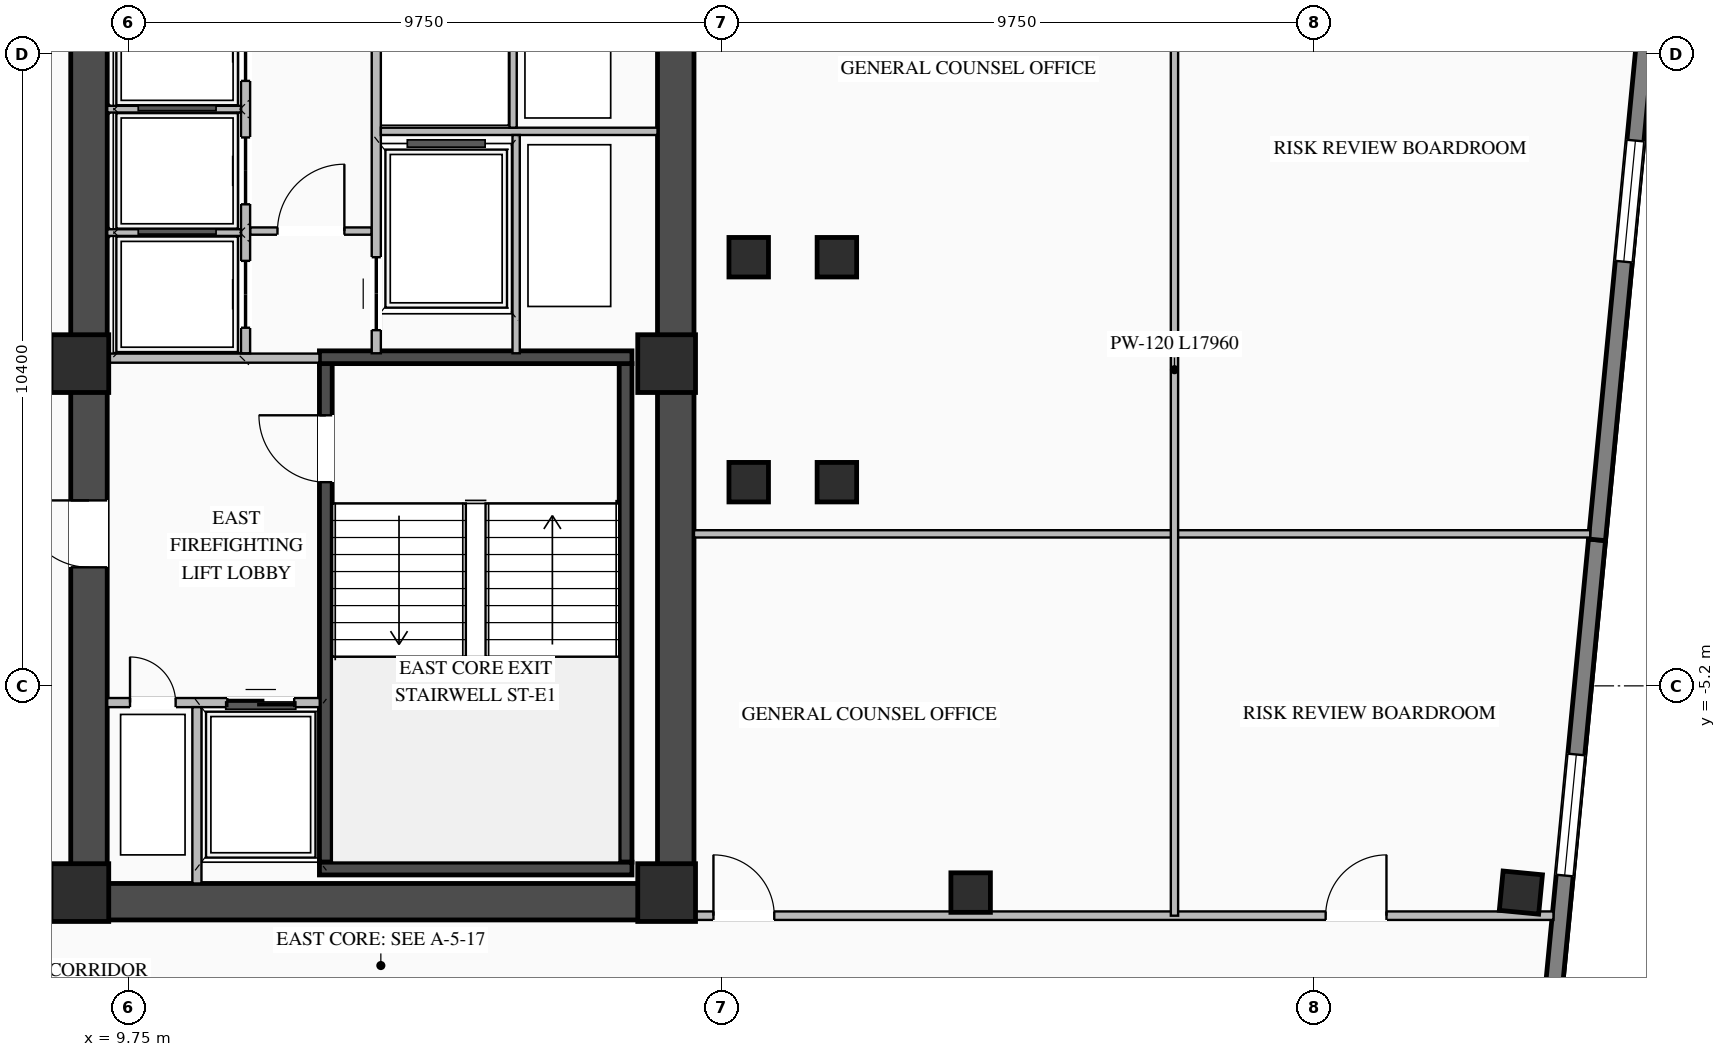
"""IFC4 building model, lengths in metres.
Left out: names, types, materials, properties, quantities, classifications, styles, units other than length and angle.
Written with IfcOpenShell. Run it as: python <this file> out.ifc"""

import sys

from ifc_helpers import new_model, si_unit, direction, frame, frame_2d, origin, origin_2d, place, context, subcontext, project, spatial, rectangle, i_section, extrude, element, fill, save


model = new_model("IFC4")
c1 = context("Model", 3, precision=1e-05, world=origin(), true_north=direction((0.0, 1.0)))
c2 = subcontext(c1, "Body", "Model", "MODEL_VIEW")
j1 = project(units=[si_unit("LENGTHUNIT", "METRE"), si_unit("PLANEANGLEUNIT", "RADIAN")], contexts=[c1])
p1 = place(None, origin())
s1 = spatial("IfcSite", under=j1, at=p1, CompositionType="ELEMENT")
p2 = place(p1, origin())
s2 = spatial("IfcBuilding", under=s1, at=p2, CompositionType="ELEMENT")
p3 = place(p2, frame((0.0, 0.0, 160.4)))
s3 = spatial("IfcBuildingStorey", under=s2, at=p3, CompositionType="ELEMENT", Elevation=160.4)
p4 = place(p3, frame((8.8, -8.75, 0.0), z_axis=(0.0, 0.0, 1.0), x_axis=(1.0, 0.0, 0.0)))
e1 = element("IfcWall", 1, at=p4, inside=s3, PredefinedType="SHEAR", context=c2, shape_type="SweptSolid", body=[
    extrude(rectangle(XDim=10.25, YDim=0.6, at=frame_2d((5.125, 0.0))), origin(), (0.0, 0.0, 1.0), 3.27),
])
p5 = place(p3, frame((9.1, -8.45, 0.0), z_axis=(0.0, 0.0, 1.0), x_axis=(0.0, 1.0, 0.0)))
e2 = element("IfcWall", 2, at=p5, inside=s3, PredefinedType="SHEAR", context=c2, shape_type="SweptSolid", body=[
    extrude(rectangle(XDim=16.9, YDim=0.6, at=frame_2d((8.45, 0.0))), origin(), (0.0, 0.0, 1.0), 3.27),
])
p6 = place(p5, frame((5.2, 0.0, 0.0)))
e3 = element("IfcOpeningElement", 3, at=p6, cuts=e2, PredefinedType="OPENING", context=c2, shape_type="SweptSolid", body=[
    extrude(rectangle(XDim=1.1, YDim=2.08, at=frame_2d((0.55, 1.04))), frame((0.0, 0.31, 0.0), z_axis=(0.0, -1.0, 0.0), x_axis=(1.0, 0.0, 0.0)), (0.0, 0.0, 1.0), 0.62),
])
p7 = place(p3, frame((18.75, -8.45, 0.0), z_axis=(0.0, 0.0, 1.0), x_axis=(0.0, 1.0, 0.0)))
e4 = element("IfcWall", 4, at=p7, inside=s3, PredefinedType="SHEAR", context=c2, shape_type="SweptSolid", body=[
    extrude(rectangle(XDim=16.9, YDim=0.6, at=frame_2d((8.45, 0.0))), origin(), (0.0, 0.0, 1.0), 3.27),
])
p8 = place(p3, frame((12.995, -8.1, 0.0), z_axis=(0.0, 0.0, 1.0), x_axis=(0.0, 1.0, 0.0)))
e5 = element("IfcWall", 5, at=p8, inside=s3, PredefinedType="SHEAR", context=c2, shape_type="SweptSolid", body=[
    extrude(rectangle(XDim=8.2, YDim=0.21, at=frame_2d((4.1, 0.0))), origin(), (0.0, 0.0, 1.0), 3.27),
])
p9 = place(p8, frame((6.25, 0.0, 0.0)))
e6 = element("IfcOpeningElement", 6, at=p9, cuts=e5, PredefinedType="OPENING", context=c2, shape_type="SweptSolid", body=[
    extrude(rectangle(XDim=1.1, YDim=2.15, at=frame_2d((0.55, 1.075))), frame((0.0, 0.115, 0.0), z_axis=(0.0, -1.0, 0.0), x_axis=(1.0, 0.0, 0.0)), (0.0, 0.0, 1.0), 0.23),
])
p10 = place(p3, frame((17.925, -8.1, 0.0), z_axis=(0.0, 0.0, 1.0), x_axis=(0.0, 1.0, 0.0)))
e7 = element("IfcWall", 7, at=p10, inside=s3, PredefinedType="SHEAR", context=c2, shape_type="SweptSolid", body=[
    extrude(rectangle(XDim=8.2, YDim=0.21, at=frame_2d((4.1, 0.0))), origin(), (0.0, 0.0, 1.0), 3.27),
])
for number, where, z_axis, x_axis in (
    (8, (12.89, -8.205, 0.0), (0.0, 0.0, 1.0), (1.0, 0.0, 0.0)),
    (9, (18.03, 0.205, 0.0), (0.0, 0.0, 1.0), (-1.0, 0.0, 0.0)),
):
    element("IfcWall", number, at=place(p3, frame(where, z_axis=z_axis, x_axis=x_axis)), inside=s3, PredefinedType="SHEAR", context=c2, shape_type="SweptSolid", body=[
        extrude(rectangle(XDim=5.14, YDim=0.21, at=frame_2d((2.57, 0.0))), origin(), (0.0, 0.0, 1.0), 3.27),
    ])
for number, where, z_axis, x_axis in (
    (10, (8.95, -8.6, 0.0), (0.0, 0.0, 1.0), (1.0, 0.0, 0.0)),
    (11, (8.95, 0.1, 0.0), (0.0, 0.0, 1.0), (1.0, 0.0, 0.0)),
    (12, (18.6, -8.6, 0.0), (0.0, 0.0, 1.0), (1.0, 0.0, 0.0)),
    (13, (18.6, 0.1, 0.0), (0.0, 0.0, 1.0), (1.0, 0.0, 0.0)),
):
    element("IfcColumn", number, at=place(p3, frame(where, z_axis=z_axis, x_axis=x_axis)), inside=s3, PredefinedType="COLUMN", context=c2, shape_type="SweptSolid", body=[
        extrude(rectangle(XDim=0.95, YDim=0.95, at=origin_2d()), origin(), (0.0, 0.0, 1.0), 3.45),
    ])
for number, where, z_axis, x_axis in (
    (14, (19.95, -1.85, 0.0), (0.0, 0.0, 1.0), (1.0, 0.0, 0.0)),
    (15, (19.95, 1.85, 0.0), (0.0, 0.0, 1.0), (1.0, 0.0, 0.0)),
    (16, (21.4, -1.85, 0.0), (0.0, 0.0, 1.0), (1.0, 0.0, 0.0)),
    (17, (21.4, 1.85, 0.0), (0.0, 0.0, 1.0), (1.0, 0.0, 0.0)),
    (18, (23.6, -8.6, 0.0), (0.0, 0.0, 1.0), (1.0, 0.0, 0.0)),
    (19, (32.649, -8.6, 0.0), (0.0, 0.0, 1.0), (0.995, -0.096, 0.0)),
):
    element("IfcColumn", number, at=place(p3, frame(where, z_axis=z_axis, x_axis=x_axis)), inside=s3, PredefinedType="COLUMN", context=c2, shape_type="SweptSolid", body=[
        extrude(i_section(OverallWidth=0.65, OverallDepth=0.65, WebThickness=0.028, FlangeThickness=0.04, at=origin_2d()), origin(), (0.0, 0.0, 1.0), 3.45),
    ])
p11 = place(p3, frame((33.901, -2.798, 0.0), z_axis=(0.0, 0.0, 1.0), x_axis=(-0.095853434568, -0.99539545864, 0.0)))
e20 = element("IfcWall", 20, at=p11, inside=s3, PredefinedType="STANDARD", context=c2, shape_type="SweptSolid", body=[
    extrude(rectangle(XDim=16.79, YDim=0.28, at=frame_2d((8.395, 0.0))), origin(), (0.0, 0.0, 1.0), 3.25),
])
p12 = place(p11, frame((3.547, 0.0, 0.76)))
e21 = element("IfcOpeningElement", 21, at=p12, cuts=e20, PredefinedType="OPENING", context=c2, shape_type="SweptSolid", body=[
    extrude(rectangle(XDim=2.0, YDim=2.05, at=frame_2d((1.0, 1.025))), frame((0.0, 0.15, 0.0), z_axis=(0.0, -1.0, 0.0), x_axis=(1.0, 0.0, 0.0)), (0.0, 0.0, 1.0), 0.3),
])
p13 = place(p11, frame((10.193, 0.0, 0.76)))
e22 = element("IfcOpeningElement", 22, at=p13, cuts=e20, PredefinedType="OPENING", context=c2, shape_type="SweptSolid", body=[
    extrude(rectangle(XDim=2.0, YDim=2.05, at=frame_2d((1.0, 1.025))), frame((0.0, 0.15, 0.0), z_axis=(0.0, -1.0, 0.0), x_axis=(1.0, 0.0, 0.0)), (0.0, 0.0, 1.0), 0.3),
])
p14 = place(p3, frame((35.51, 13.914, 0.0), z_axis=(0.0, 0.0, 1.0), x_axis=(-0.095839027265, -0.995396845913, 0.0)))
e23 = element("IfcWall", 23, at=p14, inside=s3, PredefinedType="STANDARD", context=c2, shape_type="SweptSolid", body=[
    extrude(rectangle(XDim=16.79, YDim=0.28, at=frame_2d((8.395, 0.0))), origin(), (0.0, 0.0, 1.0), 3.25),
])
p15 = place(p14, frame((5.647, 0.0, 0.76)))
e24 = element("IfcOpeningElement", 24, at=p15, cuts=e23, PredefinedType="OPENING", context=c2, shape_type="SweptSolid", body=[
    extrude(rectangle(XDim=2.0, YDim=2.05, at=frame_2d((1.0, 1.025))), frame((0.0, 0.15, 0.0), z_axis=(0.0, -1.0, 0.0), x_axis=(1.0, 0.0, 0.0)), (0.0, 0.0, 1.0), 0.3),
])
p16 = place(p14, frame((10.193, 0.0, 0.76)))
e25 = element("IfcOpeningElement", 25, at=p16, cuts=e23, PredefinedType="OPENING", context=c2, shape_type="SweptSolid", body=[
    extrude(rectangle(XDim=2.0, YDim=2.05, at=frame_2d((1.0, 1.025))), frame((0.0, 0.15, 0.0), z_axis=(0.0, -1.0, 0.0), x_axis=(1.0, 0.0, 0.0)), (0.0, 0.0, 1.0), 0.3),
])
p17 = place(p3, frame((9.4, -5.475, 0.0), z_axis=(0.0, 0.0, 1.0), x_axis=(1.0, 0.0, 0.0)))
e26 = element("IfcWall", 26, at=p17, inside=s3, PredefinedType="STANDARD", context=c2, shape_type="SweptSolid", body=[
    extrude(rectangle(XDim=3.495, YDim=0.15, at=frame_2d((1.748, 0.0))), origin(), (0.0, 0.0, 1.0), 3.25),
])
p18 = place(p17, frame((1.975, 0.0, 0.0)))
e27 = element("IfcOpeningElement", 27, at=p18, cuts=e26, PredefinedType="OPENING", context=c2, shape_type="SweptSolid", body=[
    extrude(rectangle(XDim=1.1, YDim=2.15, at=frame_2d((0.55, 1.075))), frame((0.0, 0.085, 0.0), z_axis=(0.0, -1.0, 0.0), x_axis=(1.0, 0.0, 0.0)), (0.0, 0.0, 1.0), 0.17),
])
p19 = place(p17, frame((0.375, 0.0, 0.0)))
e28 = element("IfcOpeningElement", 28, at=p19, cuts=e26, PredefinedType="OPENING", context=c2, shape_type="SweptSolid", body=[
    extrude(rectangle(XDim=0.75, YDim=2.05, at=frame_2d((0.375, 1.025))), frame((0.0, 0.085, 0.0), z_axis=(0.0, -1.0, 0.0), x_axis=(1.0, 0.0, 0.0)), (0.0, 0.0, 1.0), 0.17),
])
p20 = place(p3, frame((10.875, -8.45, 0.0), z_axis=(0.0, 0.0, 1.0), x_axis=(0.0, 1.0, 0.0)))
e29 = element("IfcWall", 29, at=p20, inside=s3, PredefinedType="STANDARD", context=c2, shape_type="SweptSolid", body=[
    extrude(rectangle(XDim=2.9, YDim=0.15, at=frame_2d((1.45, 0.0))), origin(), (0.0, 0.0, 1.0), 3.25),
])
p21 = place(p3, frame((9.4, 0.19, 0.0), z_axis=(0.0, 0.0, 1.0), x_axis=(1.0, 0.0, 0.0)))
e30 = element("IfcWall", 30, at=p21, inside=s3, PredefinedType="STANDARD", context=c2, shape_type="SweptSolid", body=[
    extrude(rectangle(XDim=3.49, YDim=0.15, at=frame_2d((1.745, 0.0))), origin(), (0.0, 0.0, 1.0), 2.645),
])
p22 = place(p3, frame((11.75, 2.28, 0.0), z_axis=(0.0, 0.0, 1.0), x_axis=(1.0, 0.0, 0.0)))
e31 = element("IfcWall", 31, at=p22, inside=s3, PredefinedType="STANDARD", context=c2, shape_type="SweptSolid", body=[
    extrude(rectangle(XDim=2.0, YDim=0.12, at=frame_2d((1.0, 0.0))), origin(), (0.0, 0.0, 1.0), 3.25),
])
p23 = place(p22, frame((0.45, 0.0, 0.0)))
e32 = element("IfcOpeningElement", 32, at=p23, cuts=e31, PredefinedType="OPENING", context=c2, shape_type="SweptSolid", body=[
    extrude(rectangle(XDim=1.1, YDim=2.1, at=frame_2d((0.55, 1.05))), frame((0.0, 0.07, 0.0), z_axis=(0.0, -1.0, 0.0), x_axis=(1.0, 0.0, 0.0)), (0.0, 0.0, 1.0), 0.14),
])
p24 = place(p3, frame((11.675, 0.27, 0.0), z_axis=(0.0, 0.0, 1.0), x_axis=(0.0, 1.0, 0.0)))
e33 = element("IfcWall", 33, at=p24, inside=s3, PredefinedType="STANDARD", context=c2, shape_type="SweptSolid", body=[
    extrude(rectangle(XDim=8.18, YDim=0.15, at=frame_2d((4.09, 0.0))), origin(), (0.0, 0.0, 1.0), 3.25),
])
p25 = place(p24, frame((0.42, 0.0, 0.0)))
e34 = element("IfcOpeningElement", 34, at=p25, cuts=e33, PredefinedType="OPENING", context=c2, shape_type="SweptSolid", body=[
    extrude(rectangle(XDim=1.1, YDim=2.1, at=frame_2d((0.55, 1.05))), frame((0.0, 0.085, 0.0), z_axis=(0.0, -1.0, 0.0), x_axis=(1.0, 0.0, 0.0)), (0.0, 0.0, 1.0), 0.17),
])
p26 = place(p24, frame((2.45, 0.0, 0.0)))
e35 = element("IfcOpeningElement", 35, at=p26, cuts=e33, PredefinedType="OPENING", context=c2, shape_type="SweptSolid", body=[
    extrude(rectangle(XDim=1.1, YDim=2.1, at=frame_2d((0.55, 1.05))), frame((0.0, 0.085, 0.0), z_axis=(0.0, -1.0, 0.0), x_axis=(1.0, 0.0, 0.0)), (0.0, 0.0, 1.0), 0.17),
])
p27 = place(p24, frame((4.48, 0.0, 0.0)))
e36 = element("IfcOpeningElement", 36, at=p27, cuts=e33, PredefinedType="OPENING", context=c2, shape_type="SweptSolid", body=[
    extrude(rectangle(XDim=1.1, YDim=2.1, at=frame_2d((0.55, 1.05))), frame((0.0, 0.085, 0.0), z_axis=(0.0, -1.0, 0.0), x_axis=(1.0, 0.0, 0.0)), (0.0, 0.0, 1.0), 0.17),
])
p28 = place(p24, frame((6.51, 0.0, 0.0)))
e37 = element("IfcOpeningElement", 37, at=p28, cuts=e33, PredefinedType="OPENING", context=c2, shape_type="SweptSolid", body=[
    extrude(rectangle(XDim=1.1, YDim=2.1, at=frame_2d((0.55, 1.05))), frame((0.0, 0.085, 0.0), z_axis=(0.0, -1.0, 0.0), x_axis=(1.0, 0.0, 0.0)), (0.0, 0.0, 1.0), 0.17),
])
for number, where, z_axis, x_axis in (
    (38, (9.4, 2.255, 0.0), (0.0, 0.0, 1.0), (1.0, 0.0, 0.0)),
    (39, (9.4, 4.285, 0.0), (0.0, 0.0, 1.0), (1.0, 0.0, 0.0)),
):
    element("IfcWall", number, at=place(p3, frame(where, z_axis=z_axis, x_axis=x_axis)), inside=s3, PredefinedType="STANDARD", context=c2, shape_type="SweptSolid", body=[
        extrude(rectangle(XDim=2.2, YDim=0.11, at=frame_2d((1.1, 0.0))), origin(), (0.0, 0.0, 1.0), 3.25),
    ])
p29 = place(p3, frame((13.825, 0.27, 0.0), z_axis=(0.0, 0.0, 1.0), x_axis=(0.0, 1.0, 0.0)))
e40 = element("IfcWall", 40, at=p29, inside=s3, PredefinedType="STANDARD", context=c2, shape_type="SweptSolid", body=[
    extrude(rectangle(XDim=8.18, YDim=0.15, at=frame_2d((4.09, 0.0))), origin(), (0.0, 0.0, 1.0), 3.25),
])
p30 = place(p29, frame((0.38, 0.0, 0.0)))
e41 = element("IfcOpeningElement", 41, at=p30, cuts=e40, PredefinedType="OPENING", context=c2, shape_type="SweptSolid", body=[
    extrude(rectangle(XDim=1.2, YDim=2.1, at=frame_2d((0.6, 1.05))), frame((0.0, 0.085, 0.0), z_axis=(0.0, -1.0, 0.0), x_axis=(1.0, 0.0, 0.0)), (0.0, 0.0, 1.0), 0.17),
])
p31 = place(p3, frame((13.9, 3.92, 0.0), z_axis=(0.0, 0.0, 1.0), x_axis=(1.0, 0.0, 0.0)))
e42 = element("IfcWall", 42, at=p31, inside=s3, PredefinedType="STANDARD", context=c2, shape_type="SweptSolid", body=[
    extrude(rectangle(XDim=4.55, YDim=0.12, at=frame_2d((2.275, 0.0))), origin(), (0.0, 0.0, 1.0), 3.25),
])
p32 = place(p3, frame((16.075, 3.98, 0.0), z_axis=(0.0, 0.0, 1.0), x_axis=(0.0, 1.0, 0.0)))
e43 = element("IfcWall", 43, at=p32, inside=s3, PredefinedType="STANDARD", context=c2, shape_type="SweptSolid", body=[
    extrude(rectangle(XDim=4.47, YDim=0.12, at=frame_2d((2.235, 0.0))), origin(), (0.0, 0.0, 1.0), 3.25),
])
p33 = place(p3, frame((16.125, 0.27, 0.0), z_axis=(0.0, 0.0, 1.0), x_axis=(0.0, 1.0, 0.0)))
e44 = element("IfcWall", 44, at=p33, inside=s3, PredefinedType="STANDARD", context=c2, shape_type="SweptSolid", body=[
    extrude(rectangle(XDim=3.59, YDim=0.12, at=frame_2d((1.795, 0.0))), origin(), (0.0, 0.0, 1.0), 3.25),
])
p34 = place(p3, frame((19.05, -8.98, 0.0), z_axis=(0.0, 0.0, 1.0), x_axis=(1.0, 0.0, 0.0)))
e45 = element("IfcWall", 45, at=p34, inside=s3, PredefinedType="STANDARD", context=c2, shape_type="SweptSolid", body=[
    extrude(rectangle(XDim=14.135, YDim=0.14, at=frame_2d((7.067, 0.0))), origin(), (0.0, 0.0, 1.0), 3.25),
])
p35 = place(p34, frame((0.32, 0.0, 0.0)))
e46 = element("IfcOpeningElement", 46, at=p35, cuts=e45, PredefinedType="OPENING", context=c2, shape_type="SweptSolid", body=[
    extrude(rectangle(XDim=1.0, YDim=2.08, at=frame_2d((0.5, 1.04))), frame((0.0, 0.08, 0.0), z_axis=(0.0, -1.0, 0.0), x_axis=(1.0, 0.0, 0.0)), (0.0, 0.0, 1.0), 0.16),
])
p36 = place(p34, frame((10.388, 0.0, 0.0)))
e47 = element("IfcOpeningElement", 47, at=p36, cuts=e45, PredefinedType="OPENING", context=c2, shape_type="SweptSolid", body=[
    extrude(rectangle(XDim=1.0, YDim=2.08, at=frame_2d((0.5, 1.04))), frame((0.0, 0.08, 0.0), z_axis=(0.0, -1.0, 0.0), x_axis=(1.0, 0.0, 0.0)), (0.0, 0.0, 1.0), 0.16),
])
p37 = place(p3, frame((19.05, -2.7, 0.0), z_axis=(0.0, 0.0, 1.0), x_axis=(1.0, 0.0, 0.0)))
e48 = element("IfcWall", 48, at=p37, inside=s3, PredefinedType="STANDARD", context=c2, shape_type="SweptSolid", body=[
    extrude(rectangle(XDim=14.74, YDim=0.12, at=frame_2d((7.37, 0.0))), origin(), (0.0, 0.0, 1.0), 3.25),
])
p38 = place(p3, frame((26.952, -8.98, 0.0), z_axis=(0.0, 0.0, 1.0), x_axis=(0.0, 1.0, 0.0)))
e49 = element("IfcWall", 49, at=p38, inside=s3, PredefinedType="STANDARD", context=c2, shape_type="SweptSolid", body=[
    extrude(rectangle(XDim=17.96, YDim=0.12, at=frame_2d((8.98, 0.0))), origin(), (0.0, 0.0, 1.0), 3.25),
])
p39 = place(p12, origin())
e50 = element("IfcWindow", 50, at=p39, inside=s3, PartitioningType="DOUBLE_PANEL_VERTICAL", PredefinedType="WINDOW", context=c2, shape_type="SweptSolid", body=[
    extrude(rectangle(XDim=2.0, YDim=2.05, at=frame_2d((1.0, 1.025))), frame((0.0, 0.03, 0.0), z_axis=(0.0, -1.0, 0.0), x_axis=(1.0, 0.0, 0.0)), (0.0, 0.0, 1.0), 0.06),
])
fill(e21, e50)
p40 = place(p16, origin())
e51 = element("IfcWindow", 51, at=p40, inside=s3, PartitioningType="DOUBLE_PANEL_VERTICAL", PredefinedType="WINDOW", context=c2, shape_type="SweptSolid", body=[
    extrude(rectangle(XDim=2.0, YDim=2.05, at=frame_2d((1.0, 1.025))), frame((0.0, 0.03, 0.0), z_axis=(0.0, -1.0, 0.0), x_axis=(1.0, 0.0, 0.0)), (0.0, 0.0, 1.0), 0.06),
])
fill(e25, e51)
p41 = place(p9, origin())
e52 = element("IfcDoor", 52, at=p41, inside=s3, OperationType="SINGLE_SWING_RIGHT", PredefinedType="DOOR", context=c2, shape_type="SweptSolid", body=[
    extrude(rectangle(XDim=1.1, YDim=2.15, at=frame_2d((0.55, 1.075))), frame((0.0, 0.025, 0.0), z_axis=(0.0, -1.0, 0.0), x_axis=(1.0, 0.0, 0.0)), (0.0, 0.0, 1.0), 0.05),
])
fill(e6, e52)
p42 = place(p18, origin())
e53 = element("IfcDoor", 53, at=p42, inside=s3, OperationType="DOUBLE_DOOR_SLIDING", PredefinedType="DOOR", context=c2, shape_type="SweptSolid", body=[
    extrude(rectangle(XDim=1.1, YDim=2.15, at=frame_2d((0.55, 1.075))), frame((0.0, 0.025, 0.0), z_axis=(0.0, -1.0, 0.0), x_axis=(1.0, 0.0, 0.0)), (0.0, 0.0, 1.0), 0.05),
])
fill(e27, e53)
p43 = place(p19, origin())
e54 = element("IfcDoor", 54, at=p43, inside=s3, OperationType="SINGLE_SWING_LEFT", PredefinedType="DOOR", context=c2, shape_type="SweptSolid", body=[
    extrude(rectangle(XDim=0.75, YDim=2.05, at=frame_2d((0.375, 1.025))), frame((0.0, 0.025, 0.0), z_axis=(0.0, -1.0, 0.0), x_axis=(1.0, 0.0, 0.0)), (0.0, 0.0, 1.0), 0.05),
])
fill(e28, e54)
p44 = place(p6, origin())
e55 = element("IfcDoor", 55, at=p44, inside=s3, OperationType="SINGLE_SWING_RIGHT", PredefinedType="DOOR", context=c2, shape_type="SweptSolid", body=[
    extrude(rectangle(XDim=1.1, YDim=2.08, at=frame_2d((0.55, 1.04))), frame((0.0, -0.205, 0.0), z_axis=(0.0, -1.0, 0.0), x_axis=(1.0, 0.0, 0.0)), (0.0, 0.0, 1.0), 0.05),
])
fill(e3, e55)
p45 = place(p23, origin())
e56 = element("IfcDoor", 56, at=p45, inside=s3, OperationType="SINGLE_SWING_RIGHT", PredefinedType="DOOR", context=c2, shape_type="SweptSolid", body=[
    extrude(rectangle(XDim=1.1, YDim=2.1, at=frame_2d((0.55, 1.05))), frame((0.0, 0.025, 0.0), z_axis=(0.0, -1.0, 0.0), x_axis=(1.0, 0.0, 0.0)), (0.0, 0.0, 1.0), 0.05),
])
fill(e32, e56)
p46 = place(p25, origin())
e57 = element("IfcDoor", 57, at=p46, inside=s3, OperationType="DOUBLE_DOOR_SLIDING", PredefinedType="DOOR", context=c2, shape_type="SweptSolid", body=[
    extrude(rectangle(XDim=1.1, YDim=2.1, at=frame_2d((0.55, 1.05))), frame((0.0, 0.025, 0.0), z_axis=(0.0, -1.0, 0.0), x_axis=(1.0, 0.0, 0.0)), (0.0, 0.0, 1.0), 0.05),
])
fill(e34, e57)
p47 = place(p26, origin())
e58 = element("IfcDoor", 58, at=p47, inside=s3, OperationType="DOUBLE_DOOR_SLIDING", PredefinedType="DOOR", context=c2, shape_type="SweptSolid", body=[
    extrude(rectangle(XDim=1.1, YDim=2.1, at=frame_2d((0.55, 1.05))), frame((0.0, 0.025, 0.0), z_axis=(0.0, -1.0, 0.0), x_axis=(1.0, 0.0, 0.0)), (0.0, 0.0, 1.0), 0.05),
])
fill(e35, e58)
p48 = place(p27, origin())
e59 = element("IfcDoor", 59, at=p48, inside=s3, OperationType="DOUBLE_DOOR_SLIDING", PredefinedType="DOOR", context=c2, shape_type="SweptSolid", body=[
    extrude(rectangle(XDim=1.1, YDim=2.1, at=frame_2d((0.55, 1.05))), frame((0.0, 0.025, 0.0), z_axis=(0.0, -1.0, 0.0), x_axis=(1.0, 0.0, 0.0)), (0.0, 0.0, 1.0), 0.05),
])
fill(e36, e59)
p49 = place(p30, origin())
e60 = element("IfcDoor", 60, at=p49, inside=s3, OperationType="DOUBLE_DOOR_SLIDING", PredefinedType="DOOR", context=c2, shape_type="SweptSolid", body=[
    extrude(rectangle(XDim=1.2, YDim=2.1, at=frame_2d((0.6, 1.05))), frame((0.0, 0.025, 0.0), z_axis=(0.0, -1.0, 0.0), x_axis=(1.0, 0.0, 0.0)), (0.0, 0.0, 1.0), 0.05),
])
fill(e41, e60)
p50 = place(p35, origin())
e61 = element("IfcDoor", 61, at=p50, inside=s3, OperationType="SINGLE_SWING_LEFT", PredefinedType="DOOR", context=c2, shape_type="SweptSolid", body=[
    extrude(rectangle(XDim=1.0, YDim=2.08, at=frame_2d((0.5, 1.04))), frame((0.0, 0.025, 0.0), z_axis=(0.0, -1.0, 0.0), x_axis=(1.0, 0.0, 0.0)), (0.0, 0.0, 1.0), 0.05),
])
fill(e46, e61)
p51 = place(p36, origin())
e62 = element("IfcDoor", 62, at=p51, inside=s3, OperationType="SINGLE_SWING_RIGHT", PredefinedType="DOOR", context=c2, shape_type="SweptSolid", body=[
    extrude(rectangle(XDim=1.0, YDim=2.08, at=frame_2d((0.5, 1.04))), frame((0.0, 0.025, 0.0), z_axis=(0.0, -1.0, 0.0), x_axis=(1.0, 0.0, 0.0)), (0.0, 0.0, 1.0), 0.05),
])
fill(e47, e62)
save(model, sys.argv[1])
